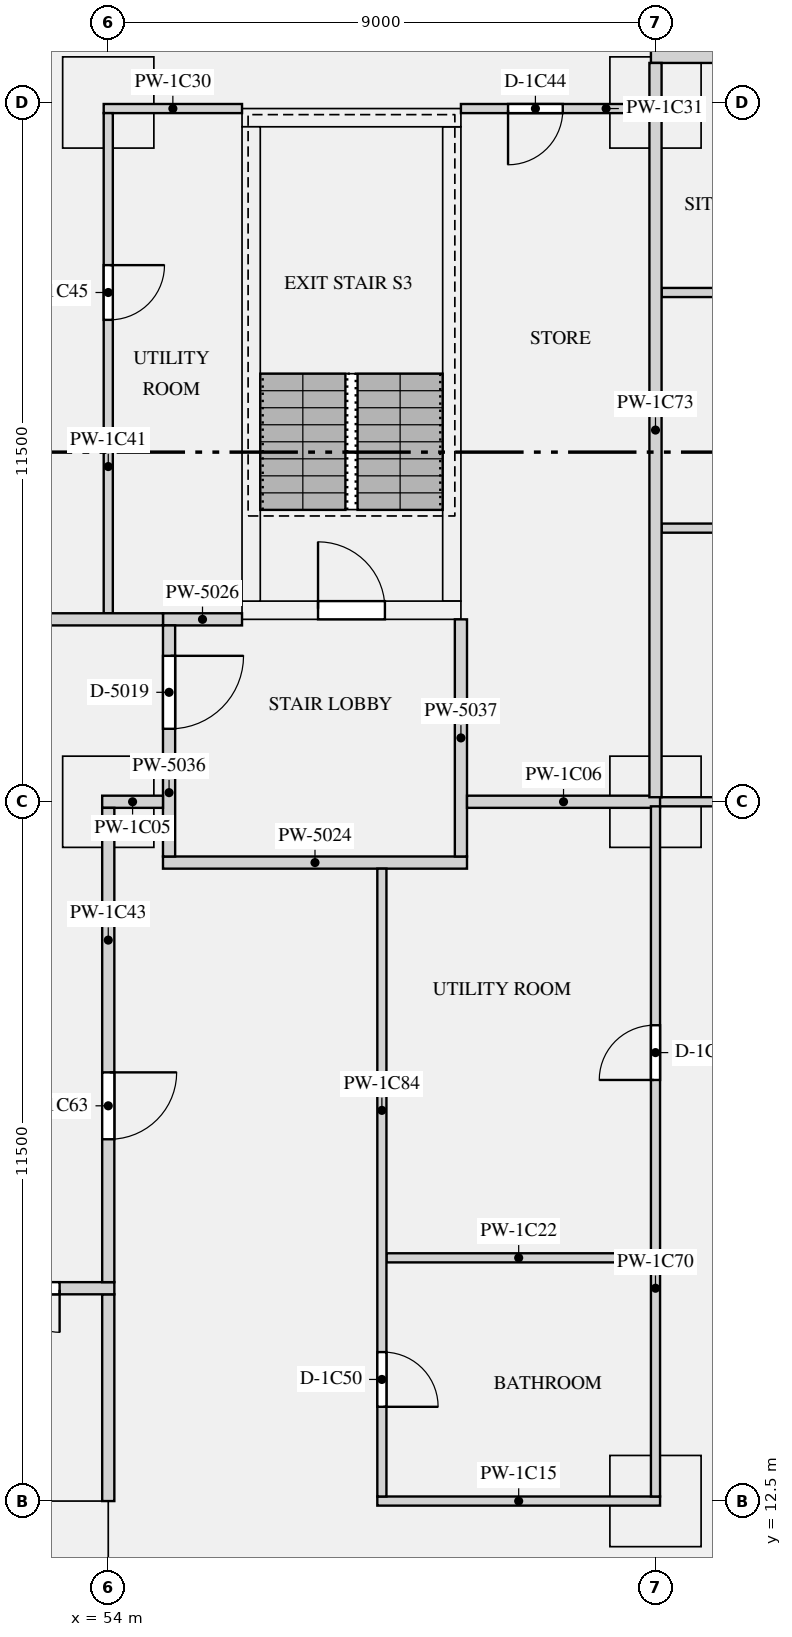
"""IFC4 building model, lengths in metres.
Left out: names, types, materials, properties, quantities, classifications, styles, units other than length and angle.
Written with IfcOpenShell. Run it as: python <this file> out.ifc"""

import sys

from ifc_helpers import new_model, si_unit, direction, frame, frame_2d, origin, origin_2d, place, context, subcontext, project, spatial, rectangle, extrude, element, fill, save


model = new_model("IFC4")
c1 = context("Model", 3, precision=1e-05, world=origin(), true_north=direction((0.0, 1.0)))
c2 = subcontext(c1, "Body", "Model", "MODEL_VIEW")
j1 = project(units=[si_unit("LENGTHUNIT", "METRE"), si_unit("PLANEANGLEUNIT", "RADIAN")], contexts=[c1])
p1 = place(None, origin())
s1 = spatial("IfcSite", under=j1, at=p1, CompositionType="ELEMENT")
p2 = place(p1, origin())
s2 = spatial("IfcBuilding", under=s1, at=p2, CompositionType="ELEMENT")
p3 = place(p2, frame((0.0, 0.0, 38.4)))
s3 = spatial("IfcBuildingStorey", under=s2, at=p3, CompositionType="ELEMENT", Elevation=38.4)
for number, where, z_axis, x_axis in (
    (1, (54.0, 24.0, 0.0), (0.0, 0.0, 1.0), (1.0, 0.0, 0.0)),
    (2, (63.0, 24.0, 0.0), (0.0, 0.0, 1.0), (1.0, 0.0, 0.0)),
    (3, (54.0, 35.5, 0.0), (0.0, 0.0, 1.0), (1.0, 0.0, 0.0)),
    (4, (63.0, 35.5, 0.0), (0.0, 0.0, 1.0), (1.0, 0.0, 0.0)),
    (5, (63.0, 12.5, 0.0), (0.0, 0.0, 1.0), (1.0, 0.0, 0.0)),
):
    element("IfcColumn", number, at=place(p3, frame(where, z_axis=z_axis, x_axis=x_axis)), inside=s3, PredefinedType="COLUMN", context=c2, shape_type="SweptSolid", body=[
        extrude(rectangle(XDim=1.5, YDim=1.5, at=origin_2d()), origin(), (0.0, 0.0, 1.0), 3.15),
    ])
p4 = place(p3, frame((53.5, 0.0, 0.0), z_axis=(0.0, 0.0, 1.0), x_axis=(0.0, 1.0, 0.0)))
e6 = element("IfcWall", 6, at=p4, inside=s3, PredefinedType="SHEAR", context=c2, shape_type="SweptSolid", body=[
    extrude(rectangle(XDim=12.5, YDim=1.0, at=frame_2d((6.25, 0.0))), origin(), (0.0, 0.0, 1.0), 3.15),
])
p5 = place(p3, frame((56.2, 27.15, 0.0), z_axis=(0.0, 0.0, 1.0), x_axis=(1.0, 0.0, 0.0)))
e7 = element("IfcWall", 7, at=p5, inside=s3, PredefinedType="SHEAR", context=c2, shape_type="SweptSolid", body=[
    extrude(rectangle(XDim=3.6, YDim=0.3, at=frame_2d((1.8, 0.0))), origin(), (0.0, 0.0, 1.0), 3.15),
])
p6 = place(p5, frame((1.25, 0.0, 0.0)))
e8 = element("IfcOpeningElement", 8, at=p6, cuts=e7, PredefinedType="OPENING", context=c2, shape_type="SweptSolid", body=[
    extrude(rectangle(XDim=1.1, YDim=2.1, at=frame_2d((0.55, 1.05))), frame((0.0, 0.16, 0.0), z_axis=(0.0, -1.0, 0.0), x_axis=(1.0, 0.0, 0.0)), (0.0, 0.0, 1.0), 0.32),
])
p7 = place(p3, frame((56.2, 35.25, 0.0), z_axis=(0.0, 0.0, 1.0), x_axis=(1.0, 0.0, 0.0)))
e9 = element("IfcWall", 9, at=p7, inside=s3, PredefinedType="SHEAR", context=c2, shape_type="SweptSolid", body=[
    extrude(rectangle(XDim=3.6, YDim=0.3, at=frame_2d((1.8, 0.0))), origin(), (0.0, 0.0, 1.0), 3.15),
])
for number, where, z_axis, x_axis in (
    (10, (56.35, 27.3, 0.0), (0.0, 0.0, 1.0), (0.0, 1.0, 0.0)),
    (11, (59.65, 27.3, 0.0), (0.0, 0.0, 1.0), (0.0, 1.0, 0.0)),
):
    element("IfcWall", number, at=place(p3, frame(where, z_axis=z_axis, x_axis=x_axis)), inside=s3, PredefinedType="SHEAR", context=c2, shape_type="SweptSolid", body=[
        extrude(rectangle(XDim=7.8, YDim=0.3, at=frame_2d((3.9, 0.0))), origin(), (0.0, 0.0, 1.0), 3.15),
    ])
p8 = place(p3, frame((54.9, 23.0, 0.0), z_axis=(0.0, 0.0, 1.0), x_axis=(1.0, 0.0, 0.0)))
e12 = element("IfcWall", 12, at=p8, inside=s3, PredefinedType="PARTITIONING", context=c2, shape_type="SweptSolid", body=[
    extrude(rectangle(XDim=5.0, YDim=0.2, at=frame_2d((2.5, 0.0))), origin(), (0.0, 0.0, 1.0), 2.83),
])
p9 = place(p3, frame((54.9, 27.0, 0.0), z_axis=(0.0, 0.0, 1.0), x_axis=(1.0, 0.0, 0.0)))
e13 = element("IfcWall", 13, at=p9, inside=s3, PredefinedType="PARTITIONING", context=c2, shape_type="SweptSolid", body=[
    extrude(rectangle(XDim=1.3, YDim=0.2, at=frame_2d((0.65, 0.0))), origin(), (0.0, 0.0, 1.0), 2.83),
])
p10 = place(p3, frame((54.0, 12.5, 0.0), z_axis=(0.0, 0.0, 1.0), x_axis=(0.0, 1.0, 0.0)))
e14 = element("IfcWall", 14, at=p10, inside=s3, PredefinedType="PARTITIONING", context=c2, shape_type="SweptSolid", body=[
    extrude(rectangle(XDim=3.4, YDim=0.2, at=frame_2d((1.7, 0.0))), origin(), (0.0, 0.0, 1.0), 2.83),
])
p11 = place(p3, frame((55.0, 23.1, 0.0), z_axis=(0.0, 0.0, 1.0), x_axis=(0.0, 1.0, 0.0)))
e15 = element("IfcWall", 15, at=p11, inside=s3, PredefinedType="PARTITIONING", context=c2, shape_type="SweptSolid", body=[
    extrude(rectangle(XDim=3.8, YDim=0.2, at=frame_2d((1.9, 0.0))), origin(), (0.0, 0.0, 1.0), 2.83),
])
p12 = place(p11, frame((2.1, 0.0, 0.0)))
e16 = element("IfcOpeningElement", 16, at=p12, cuts=e15, PredefinedType="OPENING", context=c2, shape_type="SweptSolid", body=[
    extrude(rectangle(XDim=1.2, YDim=2.1, at=frame_2d((0.6, 1.05))), frame((0.0, 0.11, 0.0), z_axis=(0.0, -1.0, 0.0), x_axis=(1.0, 0.0, 0.0)), (0.0, 0.0, 1.0), 0.22),
])
p13 = place(p3, frame((59.8, 23.1, 0.0), z_axis=(0.0, 0.0, 1.0), x_axis=(0.0, 1.0, 0.0)))
e17 = element("IfcWall", 17, at=p13, inside=s3, PredefinedType="PARTITIONING", context=c2, shape_type="SweptSolid", body=[
    extrude(rectangle(XDim=3.9, YDim=0.2, at=frame_2d((1.95, 0.0))), origin(), (0.0, 0.0, 1.0), 2.83),
])
p14 = place(p3, frame((62.925, 24.0, 0.0), z_axis=(0.0, 0.0, 1.0), x_axis=(1.0, 0.0, 0.0)))
e18 = element("IfcWall", 18, at=p14, inside=s3, PredefinedType="PARTITIONING", context=c2, shape_type="SweptSolid", body=[
    extrude(rectangle(XDim=10.275, YDim=0.15, at=frame_2d((5.137, 0.0))), origin(), (0.0, 0.0, 1.0), 2.83),
])
p15 = place(p14, frame((2.25, 0.0, 0.0)))
e19 = element("IfcOpeningElement", 19, at=p15, cuts=e18, PredefinedType="OPENING", context=c2, shape_type="SweptSolid", body=[
    extrude(rectangle(XDim=0.9, YDim=2.1, at=frame_2d((0.45, 1.05))), frame((0.0, 0.085, 0.0), z_axis=(0.0, -1.0, 0.0), x_axis=(1.0, 0.0, 0.0)), (0.0, 0.0, 1.0), 0.17),
])
p16 = place(p3, frame((53.9, 24.0, 0.0), z_axis=(0.0, 0.0, 1.0), x_axis=(1.0, 0.0, 0.0)))
e20 = element("IfcWall", 20, at=p16, inside=s3, PredefinedType="PARTITIONING", context=c2, shape_type="SweptSolid", body=[
    extrude(rectangle(XDim=1.0, YDim=0.2, at=frame_2d((0.5, 0.0))), origin(), (0.0, 0.0, 1.0), 2.83),
])
p17 = place(p3, frame((59.9, 24.0, 0.0), z_axis=(0.0, 0.0, 1.0), x_axis=(1.0, 0.0, 0.0)))
e21 = element("IfcWall", 21, at=p17, inside=s3, PredefinedType="PARTITIONING", context=c2, shape_type="SweptSolid", body=[
    extrude(rectangle(XDim=3.175, YDim=0.2, at=frame_2d((1.587, 0.0))), origin(), (0.0, 0.0, 1.0), 2.83),
])
p18 = place(p3, frame((47.9, 27.0, 0.0), z_axis=(0.0, 0.0, 1.0), x_axis=(1.0, 0.0, 0.0)))
e22 = element("IfcWall", 22, at=p18, inside=s3, PredefinedType="PARTITIONING", context=c2, shape_type="SweptSolid", body=[
    extrude(rectangle(XDim=7.0, YDim=0.2, at=frame_2d((3.5, 0.0))), origin(), (0.0, 0.0, 1.0), 2.83),
])
p19 = place(p3, frame((58.425, 12.5, 0.0), z_axis=(0.0, 0.0, 1.0), x_axis=(1.0, 0.0, 0.0)))
e23 = element("IfcWall", 23, at=p19, inside=s3, PredefinedType="PARTITIONING", context=c2, shape_type="SweptSolid", body=[
    extrude(rectangle(XDim=4.65, YDim=0.15, at=frame_2d((2.325, 0.0))), origin(), (0.0, 0.0, 1.0), 2.83),
])
p20 = place(p3, frame((63.1, 32.375, 0.0), z_axis=(0.0, 0.0, 1.0), x_axis=(1.0, 0.0, 0.0)))
e24 = element("IfcWall", 24, at=p20, inside=s3, PredefinedType="PARTITIONING", context=c2, shape_type="SweptSolid", body=[
    extrude(rectangle(XDim=12.6, YDim=0.15, at=frame_2d((6.3, 0.0))), origin(), (0.0, 0.0, 1.0), 2.83),
])
p21 = place(p20, frame((5.575, 0.0, 0.0)))
e25 = element("IfcOpeningElement", 25, at=p21, cuts=e24, PredefinedType="OPENING", context=c2, shape_type="SweptSolid", body=[
    extrude(rectangle(XDim=1.5, YDim=2.1, at=frame_2d((0.75, 1.05))), frame((0.0, 0.085, 0.0), z_axis=(0.0, -1.0, 0.0), x_axis=(1.0, 0.0, 0.0)), (0.0, 0.0, 1.0), 0.17),
])
p22 = place(p3, frame((58.575, 16.5, 0.0), z_axis=(0.0, 0.0, 1.0), x_axis=(1.0, 0.0, 0.0)))
e26 = element("IfcWall", 26, at=p22, inside=s3, PredefinedType="PARTITIONING", context=c2, shape_type="SweptSolid", body=[
    extrude(rectangle(XDim=4.35, YDim=0.15, at=frame_2d((2.175, 0.0))), origin(), (0.0, 0.0, 1.0), 2.83),
])
p23 = place(p3, frame((63.1, 28.5, 0.0), z_axis=(0.0, 0.0, 1.0), x_axis=(1.0, 0.0, 0.0)))
e27 = element("IfcWall", 27, at=p23, inside=s3, PredefinedType="PARTITIONING", context=c2, shape_type="SweptSolid", body=[
    extrude(rectangle(XDim=10.1, YDim=0.15, at=frame_2d((5.05, 0.0))), origin(), (0.0, 0.0, 1.0), 2.83),
])
p24 = place(p23, frame((4.325, 0.0, 0.0)))
e28 = element("IfcOpeningElement", 28, at=p24, cuts=e27, PredefinedType="OPENING", context=c2, shape_type="SweptSolid", body=[
    extrude(rectangle(XDim=1.5, YDim=2.1, at=frame_2d((0.75, 1.05))), frame((0.0, 0.085, 0.0), z_axis=(0.0, -1.0, 0.0), x_axis=(1.0, 0.0, 0.0)), (0.0, 0.0, 1.0), 0.17),
])
p25 = place(p3, frame((62.925, 36.25, 0.0), z_axis=(0.0, 0.0, 1.0), x_axis=(1.0, 0.0, 0.0)))
e29 = element("IfcWall", 29, at=p25, inside=s3, PredefinedType="PARTITIONING", context=c2, shape_type="SweptSolid", body=[
    extrude(rectangle(XDim=12.775, YDim=0.2, at=frame_2d((6.387, 0.0))), origin(), (0.0, 0.0, 1.0), 2.83),
])
p26 = place(p3, frame((53.925, 35.4, 0.0), z_axis=(0.0, 0.0, 1.0), x_axis=(1.0, 0.0, 0.0)))
e30 = element("IfcWall", 30, at=p26, inside=s3, PredefinedType="PARTITIONING", context=c2, shape_type="SweptSolid", body=[
    extrude(rectangle(XDim=2.275, YDim=0.15, at=frame_2d((1.137, 0.0))), origin(), (0.0, 0.0, 1.0), 2.83),
])
p27 = place(p3, frame((59.8, 35.4, 0.0), z_axis=(0.0, 0.0, 1.0), x_axis=(1.0, 0.0, 0.0)))
e31 = element("IfcWall", 31, at=p27, inside=s3, PredefinedType="PARTITIONING", context=c2, shape_type="SweptSolid", body=[
    extrude(rectangle(XDim=3.1, YDim=0.15, at=frame_2d((1.55, 0.0))), origin(), (0.0, 0.0, 1.0), 2.83),
])
p28 = place(p27, frame((0.775, 0.0, 0.0)))
e32 = element("IfcOpeningElement", 32, at=p28, cuts=e31, PredefinedType="OPENING", context=c2, shape_type="SweptSolid", body=[
    extrude(rectangle(XDim=0.9, YDim=2.1, at=frame_2d((0.45, 1.05))), frame((0.0, 0.085, 0.0), z_axis=(0.0, -1.0, 0.0), x_axis=(1.0, 0.0, 0.0)), (0.0, 0.0, 1.0), 0.17),
])
p29 = place(p3, frame((17.9, 16.0, 0.0), z_axis=(0.0, 0.0, 1.0), x_axis=(1.0, 0.0, 0.0)))
e33 = element("IfcWall", 33, at=p29, inside=s3, PredefinedType="PARTITIONING", context=c2, shape_type="SweptSolid", body=[
    extrude(rectangle(XDim=36.2, YDim=0.2, at=frame_2d((18.1, 0.0))), origin(), (0.0, 0.0, 1.0), 2.83),
])
p30 = place(p29, frame((0.9, 0.0, 0.0)))
e34 = element("IfcOpeningElement", 34, at=p30, cuts=e33, PredefinedType="OPENING", context=c2, shape_type="SweptSolid", body=[
    extrude(rectangle(XDim=1.4, YDim=2.1, at=frame_2d((0.7, 1.05))), frame((0.0, 0.11, 0.0), z_axis=(0.0, -1.0, 0.0), x_axis=(1.0, 0.0, 0.0)), (0.0, 0.0, 1.0), 0.22),
])
p31 = place(p29, frame((33.9, 0.0, 0.0)))
e35 = element("IfcOpeningElement", 35, at=p31, cuts=e33, PredefinedType="OPENING", context=c2, shape_type="SweptSolid", body=[
    extrude(rectangle(XDim=1.4, YDim=2.1, at=frame_2d((0.7, 1.05))), frame((0.0, 0.11, 0.0), z_axis=(0.0, -1.0, 0.0), x_axis=(1.0, 0.0, 0.0)), (0.0, 0.0, 1.0), 0.22),
])
p32 = place(p3, frame((54.0, 27.1, 0.0), z_axis=(0.0, 0.0, 1.0), x_axis=(0.0, 1.0, 0.0)))
e36 = element("IfcWall", 36, at=p32, inside=s3, PredefinedType="PARTITIONING", context=c2, shape_type="SweptSolid", body=[
    extrude(rectangle(XDim=8.225, YDim=0.15, at=frame_2d((4.112, 0.0))), origin(), (0.0, 0.0, 1.0), 2.83),
])
p33 = place(p32, frame((4.825, 0.0, 0.0)))
e37 = element("IfcOpeningElement", 37, at=p33, cuts=e36, PredefinedType="OPENING", context=c2, shape_type="SweptSolid", body=[
    extrude(rectangle(XDim=0.9, YDim=2.1, at=frame_2d((0.45, 1.05))), frame((0.0, 0.085, 0.0), z_axis=(0.0, -1.0, 0.0), x_axis=(1.0, 0.0, 0.0)), (0.0, 0.0, 1.0), 0.17),
])
p34 = place(p3, frame((54.0, 16.1, 0.0), z_axis=(0.0, 0.0, 1.0), x_axis=(0.0, 1.0, 0.0)))
e38 = element("IfcWall", 38, at=p34, inside=s3, PredefinedType="PARTITIONING", context=c2, shape_type="SweptSolid", body=[
    extrude(rectangle(XDim=7.8, YDim=0.2, at=frame_2d((3.9, 0.0))), origin(), (0.0, 0.0, 1.0), 2.83),
])
p35 = place(p34, frame((2.35, 0.0, 0.0)))
e39 = element("IfcOpeningElement", 39, at=p35, cuts=e38, PredefinedType="OPENING", context=c2, shape_type="SweptSolid", body=[
    extrude(rectangle(XDim=1.1, YDim=2.1, at=frame_2d((0.55, 1.05))), frame((0.0, 0.11, 0.0), z_axis=(0.0, -1.0, 0.0), x_axis=(1.0, 0.0, 0.0)), (0.0, 0.0, 1.0), 0.22),
])
p36 = place(p3, frame((63.0, 12.575, 0.0), z_axis=(0.0, 0.0, 1.0), x_axis=(0.0, 1.0, 0.0)))
e40 = element("IfcWall", 40, at=p36, inside=s3, PredefinedType="PARTITIONING", context=c2, shape_type="SweptSolid", body=[
    extrude(rectangle(XDim=11.35, YDim=0.15, at=frame_2d((5.675, 0.0))), origin(), (0.0, 0.0, 1.0), 2.83),
])
p37 = place(p36, frame((6.85, 0.0, 0.0)))
e41 = element("IfcOpeningElement", 41, at=p37, cuts=e40, PredefinedType="OPENING", context=c2, shape_type="SweptSolid", body=[
    extrude(rectangle(XDim=0.9, YDim=2.1, at=frame_2d((0.45, 1.05))), frame((0.0, 0.085, 0.0), z_axis=(0.0, -1.0, 0.0), x_axis=(1.0, 0.0, 0.0)), (0.0, 0.0, 1.0), 0.17),
])
p38 = place(p3, frame((63.0, 24.075, 0.0), z_axis=(0.0, 0.0, 1.0), x_axis=(0.0, 1.0, 0.0)))
e42 = element("IfcWall", 42, at=p38, inside=s3, PredefinedType="PARTITIONING", context=c2, shape_type="SweptSolid", body=[
    extrude(rectangle(XDim=12.075, YDim=0.2, at=frame_2d((6.038, 0.0))), origin(), (0.0, 0.0, 1.0), 2.83),
])
p39 = place(p3, frame((58.5, 12.575, 0.0), z_axis=(0.0, 0.0, 1.0), x_axis=(0.0, 1.0, 0.0)))
e43 = element("IfcWall", 43, at=p39, inside=s3, PredefinedType="PARTITIONING", context=c2, shape_type="SweptSolid", body=[
    extrude(rectangle(XDim=10.325, YDim=0.15, at=frame_2d((5.163, 0.0))), origin(), (0.0, 0.0, 1.0), 2.83),
])
p40 = place(p39, frame((1.475, 0.0, 0.0)))
e44 = element("IfcOpeningElement", 44, at=p40, cuts=e43, PredefinedType="OPENING", context=c2, shape_type="SweptSolid", body=[
    extrude(rectangle(XDim=0.9, YDim=2.1, at=frame_2d((0.45, 1.05))), frame((0.0, 0.085, 0.0), z_axis=(0.0, -1.0, 0.0), x_axis=(1.0, 0.0, 0.0)), (0.0, 0.0, 1.0), 0.17),
])
p41 = place(p6, origin())
e45 = element("IfcDoor", 45, at=p41, inside=s3, OperationType="SINGLE_SWING_LEFT", PredefinedType="DOOR", context=c2, shape_type="SweptSolid", body=[
    extrude(rectangle(XDim=1.1, YDim=2.1, at=frame_2d((0.55, 1.05))), frame((0.0, 0.025, 0.0), z_axis=(0.0, -1.0, 0.0), x_axis=(1.0, 0.0, 0.0)), (0.0, 0.0, 1.0), 0.05),
])
fill(e8, e45)
p42 = place(p12, frame((1.2, 0.0, 0.0), z_axis=(0.0, 0.0, 1.0), x_axis=(-1.0, 0.0, 0.0)))
e46 = element("IfcDoor", 46, at=p42, inside=s3, OperationType="SINGLE_SWING_LEFT", PredefinedType="DOOR", context=c2, shape_type="SweptSolid", body=[
    extrude(rectangle(XDim=1.2, YDim=2.1, at=frame_2d((0.6, 1.05))), frame((0.0, 0.025, 0.0), z_axis=(0.0, -1.0, 0.0), x_axis=(1.0, 0.0, 0.0)), (0.0, 0.0, 1.0), 0.05),
])
fill(e16, e46)
p43 = place(p31, frame((1.4, 0.0, 0.0), z_axis=(0.0, 0.0, 1.0), x_axis=(-1.0, 0.0, 0.0)))
e47 = element("IfcDoor", 47, at=p43, inside=s3, OperationType="DOUBLE_DOOR_SINGLE_SWING", PredefinedType="DOOR", context=c2, shape_type="SweptSolid", body=[
    extrude(rectangle(XDim=1.4, YDim=2.1, at=frame_2d((0.7, 1.05))), frame((0.0, 0.025, 0.0), z_axis=(0.0, -1.0, 0.0), x_axis=(1.0, 0.0, 0.0)), (0.0, 0.0, 1.0), 0.05),
])
fill(e35, e47)
p44 = place(p28, frame((0.9, 0.0, 0.0), z_axis=(0.0, 0.0, 1.0), x_axis=(-1.0, 0.0, 0.0)))
e48 = element("IfcDoor", 48, at=p44, inside=s3, OperationType="SINGLE_SWING_RIGHT", PredefinedType="DOOR", context=c2, shape_type="SweptSolid", body=[
    extrude(rectangle(XDim=0.9, YDim=2.1, at=frame_2d((0.45, 1.05))), frame((0.0, 0.025, 0.0), z_axis=(0.0, -1.0, 0.0), x_axis=(1.0, 0.0, 0.0)), (0.0, 0.0, 1.0), 0.05),
])
fill(e32, e48)
p45 = place(p33, frame((0.9, 0.0, 0.0), z_axis=(0.0, 0.0, 1.0), x_axis=(-1.0, 0.0, 0.0)))
e49 = element("IfcDoor", 49, at=p45, inside=s3, OperationType="SINGLE_SWING_LEFT", PredefinedType="DOOR", context=c2, shape_type="SweptSolid", body=[
    extrude(rectangle(XDim=0.9, YDim=2.1, at=frame_2d((0.45, 1.05))), frame((0.0, 0.025, 0.0), z_axis=(0.0, -1.0, 0.0), x_axis=(1.0, 0.0, 0.0)), (0.0, 0.0, 1.0), 0.05),
])
fill(e37, e49)
p46 = place(p40, frame((0.9, 0.0, 0.0), z_axis=(0.0, 0.0, 1.0), x_axis=(-1.0, 0.0, 0.0)))
e50 = element("IfcDoor", 50, at=p46, inside=s3, OperationType="SINGLE_SWING_RIGHT", PredefinedType="DOOR", context=c2, shape_type="SweptSolid", body=[
    extrude(rectangle(XDim=0.9, YDim=2.1, at=frame_2d((0.45, 1.05))), frame((0.0, 0.025, 0.0), z_axis=(0.0, -1.0, 0.0), x_axis=(1.0, 0.0, 0.0)), (0.0, 0.0, 1.0), 0.05),
])
fill(e44, e50)
p47 = place(p37, origin())
e51 = element("IfcDoor", 51, at=p47, inside=s3, OperationType="SINGLE_SWING_LEFT", PredefinedType="DOOR", context=c2, shape_type="SweptSolid", body=[
    extrude(rectangle(XDim=0.9, YDim=2.1, at=frame_2d((0.45, 1.05))), frame((0.0, 0.025, 0.0), z_axis=(0.0, -1.0, 0.0), x_axis=(1.0, 0.0, 0.0)), (0.0, 0.0, 1.0), 0.05),
])
fill(e41, e51)
p48 = place(p35, frame((1.1, 0.0, 0.0), z_axis=(0.0, 0.0, 1.0), x_axis=(-1.0, 0.0, 0.0)))
e52 = element("IfcDoor", 52, at=p48, inside=s3, OperationType="SINGLE_SWING_LEFT", PredefinedType="DOOR", context=c2, shape_type="SweptSolid", body=[
    extrude(rectangle(XDim=1.1, YDim=2.1, at=frame_2d((0.55, 1.05))), frame((0.0, 0.025, 0.0), z_axis=(0.0, -1.0, 0.0), x_axis=(1.0, 0.0, 0.0)), (0.0, 0.0, 1.0), 0.05),
])
fill(e39, e52)
save(model, sys.argv[1])
